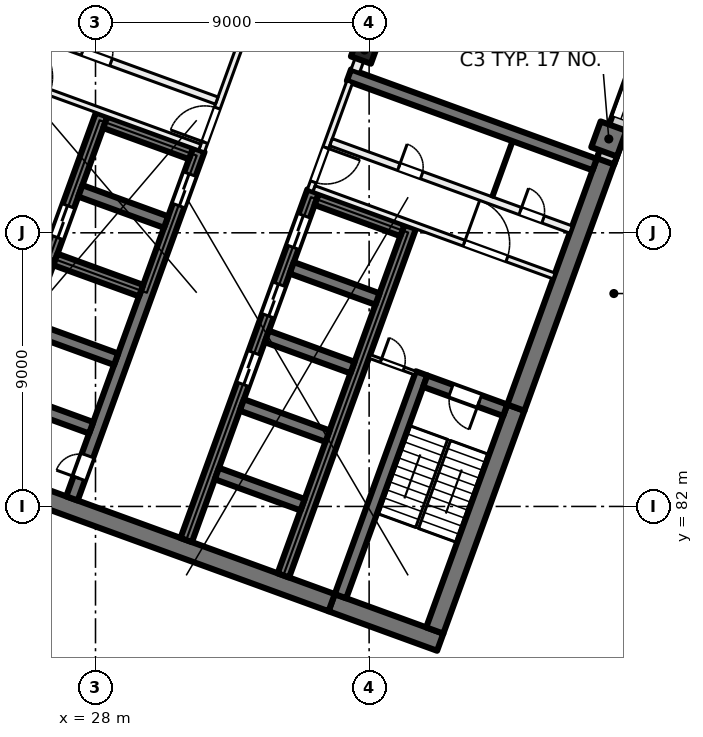
"""IFC4 building model, lengths in metres.
Left out: names, types, materials, properties, quantities, classifications, styles, units other than length and angle.
Written with IfcOpenShell. Run it as: python <this file> out.ifc"""

import sys

from ifc_helpers import new_model, si_unit, direction, frame, frame_2d, origin, origin_2d, place, context, subcontext, project, spatial, rectangle, extrude, element, fill, save


model = new_model("IFC4")
c1 = context("Model", 3, precision=1e-05, world=origin(), true_north=direction((0.0, 1.0)))
c2 = subcontext(c1, "Body", "Model", "MODEL_VIEW")
j1 = project(units=[si_unit("LENGTHUNIT", "METRE"), si_unit("PLANEANGLEUNIT", "RADIAN")], contexts=[c1])
p1 = place(None, origin())
s1 = spatial("IfcSite", under=j1, at=p1, CompositionType="ELEMENT")
p2 = place(p1, origin())
s2 = spatial("IfcBuilding", under=s1, at=p2, CompositionType="ELEMENT")
p3 = place(p2, frame((0.0, 0.0, 35.5)))
s3 = spatial("IfcBuildingStorey", under=s2, at=p3, CompositionType="ELEMENT", Elevation=35.5)
p4 = place(p3, frame((36.849, 97.011, 0.0), z_axis=(0.0, 0.0, 1.0), x_axis=(-0.342020143326, -0.939692620786, 0.0)))
e1 = element("IfcColumn", 1, at=p4, inside=s3, PredefinedType="COLUMN", context=c2, shape_type="SweptSolid", body=[
    extrude(rectangle(XDim=0.7, YDim=0.7, at=origin_2d()), origin(), (0.0, 0.0, 1.0), 4.0),
])
p5 = place(p3, frame((44.884, 94.087, 0.0), z_axis=(0.0, 0.0, 1.0), x_axis=(-0.342020143326, -0.939692620786, 0.0)))
e2 = element("IfcColumn", 2, at=p5, inside=s3, PredefinedType="COLUMN", context=c2, shape_type="SweptSolid", body=[
    extrude(rectangle(XDim=0.9, YDim=0.9, at=origin_2d()), origin(), (0.0, 0.0, 1.0), 4.0),
])
p6 = place(p3, frame((39.338, 77.535, 0.0), z_axis=(0.0, 0.0, 1.0), x_axis=(-0.939701471648, 0.341995824804, 0.0)))
e3 = element("IfcWall", 3, at=p6, inside=s3, PredefinedType="SHEAR", context=c2, shape_type="SweptSolid", body=[
    extrude(rectangle(XDim=3.8, YDim=0.6, at=frame_2d((1.9, 0.0))), origin(), (0.0, 0.0, 1.0), 4.0),
])
p7 = place(p3, frame((35.767, 78.835, 0.0), z_axis=(0.0, 0.0, 1.0), x_axis=(-0.939692894512, 0.342019391267, 0.0)))
e4 = element("IfcWall", 4, at=p7, inside=s3, PredefinedType="SHEAR", context=c2, shape_type="SweptSolid", body=[
    extrude(rectangle(XDim=14.4, YDim=0.6, at=frame_2d((7.2, 0.0))), origin(), (0.0, 0.0, 1.0), 4.0),
])
p8 = place(p3, frame((39.159, 77.92, 0.0), z_axis=(0.0, 0.0, 1.0), x_axis=(0.342016982193, 0.939693771338, 0.0)))
e5 = element("IfcWall", 5, at=p8, inside=s3, PredefinedType="SHEAR", context=c2, shape_type="SweptSolid", body=[
    extrude(rectangle(XDim=7.8, YDim=0.6, at=frame_2d((3.9, 0.0))), origin(), (0.0, 0.0, 1.0), 4.0),
])
p9 = place(p3, frame((41.827, 85.249, 0.0), z_axis=(0.0, 0.0, 1.0), x_axis=(0.342016162452, 0.939694069696, 0.0)))
e6 = element("IfcWall", 6, at=p9, inside=s3, PredefinedType="SHEAR", context=c2, shape_type="SweptSolid", body=[
    extrude(rectangle(XDim=8.9, YDim=0.6, at=frame_2d((4.45, 0.0))), origin(), (0.0, 0.0, 1.0), 4.0),
])
p10 = place(p3, frame((36.058, 79.048, 0.0), z_axis=(0.0, 0.0, 1.0), x_axis=(0.342016982193, 0.939693771338, 0.0)))
e7 = element("IfcWall", 7, at=p10, inside=s3, PredefinedType="SHEAR", context=c2, shape_type="SweptSolid", body=[
    extrude(rectangle(XDim=7.8, YDim=0.4, at=frame_2d((3.9, 0.0))), origin(), (0.0, 0.0, 1.0), 4.0),
])
p11 = place(p3, frame((41.476, 85.164, 0.0), z_axis=(0.0, 0.0, 1.0), x_axis=(-0.939678810556, 0.342058084236, 0.0)))
e8 = element("IfcWall", 8, at=p11, inside=s3, PredefinedType="SHEAR", context=c2, shape_type="SweptSolid", body=[
    extrude(rectangle(XDim=2.8, YDim=0.4, at=frame_2d((1.4, 0.0))), origin(), (0.0, 0.0, 1.0), 4.0),
])
p12 = place(p11, frame((0.9, 0.0, 0.0)))
e9 = element("IfcOpeningElement", 9, at=p12, cuts=e8, PredefinedType="OPENING", context=c2, shape_type="SweptSolid", body=[
    extrude(rectangle(XDim=1.0, YDim=2.1, at=frame_2d((0.5, 1.05))), frame((0.0, 0.21, 0.0), z_axis=(0.0, -1.0, 0.0), x_axis=(1.0, 0.0, 0.0)), (0.0, 0.0, 1.0), 0.42),
])
p13 = place(p3, frame((30.984, 80.895, 0.0), z_axis=(0.0, 0.0, 1.0), x_axis=(0.342021021735, 0.939692301071, 0.0)))
e10 = element("IfcWall", 10, at=p13, inside=s3, PredefinedType="SHEAR", context=c2, shape_type="SweptSolid", body=[
    extrude(rectangle(XDim=12.2, YDim=0.4, at=frame_2d((6.1, 0.0))), origin(), (0.0, 0.0, 1.0), 4.0),
])
p14 = place(p13, frame((5.45, 0.0, 0.0)))
e11 = element("IfcOpeningElement", 11, at=p14, cuts=e10, PredefinedType="OPENING", context=c2, shape_type="SweptSolid", body=[
    extrude(rectangle(XDim=1.1, YDim=2.1, at=frame_2d((0.55, 1.05))), frame((0.0, 0.21, 0.0), z_axis=(0.0, -1.0, 0.0), x_axis=(1.0, 0.0, 0.0)), (0.0, 0.0, 1.0), 0.42),
])
p15 = place(p13, frame((7.85, 0.0, 0.0)))
e12 = element("IfcOpeningElement", 12, at=p15, cuts=e10, PredefinedType="OPENING", context=c2, shape_type="SweptSolid", body=[
    extrude(rectangle(XDim=1.1, YDim=2.1, at=frame_2d((0.55, 1.05))), frame((0.0, 0.21, 0.0), z_axis=(0.0, -1.0, 0.0), x_axis=(1.0, 0.0, 0.0)), (0.0, 0.0, 1.0), 0.42),
])
p16 = place(p13, frame((10.25, 0.0, 0.0)))
e13 = element("IfcOpeningElement", 13, at=p16, cuts=e10, PredefinedType="OPENING", context=c2, shape_type="SweptSolid", body=[
    extrude(rectangle(XDim=1.1, YDim=2.1, at=frame_2d((0.55, 1.05))), frame((0.0, 0.21, 0.0), z_axis=(0.0, -1.0, 0.0), x_axis=(1.0, 0.0, 0.0)), (0.0, 0.0, 1.0), 0.42),
])
p17 = place(p3, frame((34.178, 79.732, 0.0), z_axis=(0.0, 0.0, 1.0), x_axis=(0.342014590177, 0.939694641948, 0.0)))
e14 = element("IfcWall", 14, at=p17, inside=s3, PredefinedType="SHEAR", context=c2, shape_type="SweptSolid", body=[
    extrude(rectangle(XDim=12.2, YDim=0.4, at=frame_2d((6.1, 0.0))), origin(), (0.0, 0.0, 1.0), 4.0),
])
for number, where, z_axis, x_axis in (
    (15, (34.812, 82.056, 0.0), (0.0, 0.0, 1.0), (-0.94, 0.342, 0.0)),
    (16, (35.632, 84.311, 0.0), (0.0, 0.0, 1.0), (-0.94, 0.342, 0.0)),
    (17, (36.453, 86.566, 0.0), (0.0, 0.0, 1.0), (-0.94, 0.342, 0.0)),
    (18, (37.274, 88.822, 0.0), (0.0, 0.0, 1.0), (-0.94, 0.342, 0.0)),
):
    element("IfcWall", number, at=place(p3, frame(where, z_axis=z_axis, x_axis=x_axis)), inside=s3, PredefinedType="SHEAR", context=c2, shape_type="SweptSolid", body=[
        extrude(rectangle(XDim=3.0, YDim=0.4, at=frame_2d((1.5, 0.0))), origin(), (0.0, 0.0, 1.0), 4.0),
    ])
p18 = place(p3, frame((38.095, 91.077, 0.0), z_axis=(0.0, 0.0, 1.0), x_axis=(-0.939676934218, 0.342063238742, 0.0)))
e19 = element("IfcWall", 19, at=p18, inside=s3, PredefinedType="SHEAR", context=c2, shape_type="SweptSolid", body=[
    extrude(rectangle(XDim=3.0, YDim=0.4, at=frame_2d((1.5, 0.0))), origin(), (0.0, 0.0, 1.0), 4.0),
])
p19 = place(p3, frame((27.225, 82.263, 0.0), z_axis=(0.0, 0.0, 1.0), x_axis=(0.342014590177, 0.939694641948, 0.0)))
e20 = element("IfcWall", 20, at=p19, inside=s3, PredefinedType="SHEAR", context=c2, shape_type="SweptSolid", body=[
    extrude(rectangle(XDim=12.2, YDim=0.4, at=frame_2d((6.1, 0.0))), origin(), (0.0, 0.0, 1.0), 4.0),
])
p20 = place(p19, frame((10.25, 0.0, 0.0)))
e21 = element("IfcOpeningElement", 21, at=p20, cuts=e20, PredefinedType="OPENING", context=c2, shape_type="SweptSolid", body=[
    extrude(rectangle(XDim=1.1, YDim=2.1, at=frame_2d((0.55, 1.05))), frame((0.0, 0.21, 0.0), z_axis=(0.0, -1.0, 0.0), x_axis=(1.0, 0.0, 0.0)), (0.0, 0.0, 1.0), 0.42),
])
p21 = place(p19, frame((0.7, 0.0, 0.0)))
e22 = element("IfcOpeningElement", 22, at=p21, cuts=e20, PredefinedType="OPENING", context=c2, shape_type="SweptSolid", body=[
    extrude(rectangle(XDim=0.8, YDim=2.1, at=frame_2d((0.4, 1.05))), frame((0.0, 0.21, 0.0), z_axis=(0.0, -1.0, 0.0), x_axis=(1.0, 0.0, 0.0)), (0.0, 0.0, 1.0), 0.42),
])
p22 = place(p3, frame((24.03, 83.426, 0.0), z_axis=(0.0, 0.0, 1.0), x_axis=(0.342014590177, 0.939694641948, 0.0)))
e23 = element("IfcWall", 23, at=p22, inside=s3, PredefinedType="SHEAR", context=c2, shape_type="SweptSolid", body=[
    extrude(rectangle(XDim=12.2, YDim=0.4, at=frame_2d((6.1, 0.0))), origin(), (0.0, 0.0, 1.0), 4.0),
])
p23 = place(p22, frame((7.9, 0.0, 0.0)))
e24 = element("IfcOpeningElement", 24, at=p23, cuts=e23, PredefinedType="OPENING", context=c2, shape_type="SweptSolid", body=[
    extrude(rectangle(XDim=1.1, YDim=2.1, at=frame_2d((0.55, 1.05))), frame((0.0, 0.21, 0.0), z_axis=(0.0, -1.0, 0.0), x_axis=(1.0, 0.0, 0.0)), (0.0, 0.0, 1.0), 0.42),
])
p24 = place(p3, frame((27.858, 84.587, 0.0), z_axis=(0.0, 0.0, 1.0), x_axis=(-0.939686455819, 0.342037080957, 0.0)))
e25 = element("IfcWall", 25, at=p24, inside=s3, PredefinedType="SHEAR", context=c2, shape_type="SweptSolid", body=[
    extrude(rectangle(XDim=3.0, YDim=0.4, at=frame_2d((1.5, 0.0))), origin(), (0.0, 0.0, 1.0), 4.0),
])
p25 = place(p3, frame((28.678, 86.842, 0.0), z_axis=(0.0, 0.0, 1.0), x_axis=(-0.939676934218, 0.342063238742, 0.0)))
e26 = element("IfcWall", 26, at=p25, inside=s3, PredefinedType="SHEAR", context=c2, shape_type="SweptSolid", body=[
    extrude(rectangle(XDim=3.0, YDim=0.4, at=frame_2d((1.5, 0.0))), origin(), (0.0, 0.0, 1.0), 4.0),
])
for number, where, z_axis, x_axis in (
    (27, (29.5, 89.097, 0.0), (0.0, 0.0, 1.0), (-0.94, 0.342, 0.0)),
    (28, (30.32, 91.353, 0.0), (0.0, 0.0, 1.0), (-0.94, 0.342, 0.0)),
    (29, (31.141, 93.608, 0.0), (0.0, 0.0, 1.0), (-0.94, 0.342, 0.0)),
):
    element("IfcWall", number, at=place(p3, frame(where, z_axis=z_axis, x_axis=x_axis)), inside=s3, PredefinedType="SHEAR", context=c2, shape_type="SweptSolid", body=[
        extrude(rectangle(XDim=3.0, YDim=0.4, at=frame_2d((1.5, 0.0))), origin(), (0.0, 0.0, 1.0), 4.0),
    ])
p26 = place(p3, frame((44.418, 93.245, 0.0), z_axis=(0.0, 0.0, 1.0), x_axis=(-0.93969060187, 0.342025690201, 0.0)))
e30 = element("IfcWall", 30, at=p26, inside=s3, PredefinedType="SHEAR", context=c2, shape_type="SweptSolid", body=[
    extrude(rectangle(XDim=8.6, YDim=0.4, at=frame_2d((4.3, 0.0))), origin(), (0.0, 0.0, 1.0), 4.0),
])
p27 = place(p3, frame((52.212, 113.783, 0.0), z_axis=(0.0, 0.0, 1.0), x_axis=(-0.34202521188, -0.939690775968, 0.0)))
e31 = element("IfcWall", 31, at=p27, inside=s3, PredefinedType="SOLIDWALL", context=c2, shape_type="SweptSolid", body=[
    extrude(rectangle(XDim=21.745, YDim=0.6, at=frame_2d((10.873, 0.0))), origin(), (0.0, 0.0, 1.0), 3.625),
])
p28 = place(p27, frame((3.765, 0.0, 0.9)))
e32 = element("IfcOpeningElement", 32, at=p28, cuts=e31, PredefinedType="OPENING", context=c2, shape_type="SweptSolid", body=[
    extrude(rectangle(XDim=3.0, YDim=2.4, at=frame_2d((1.5, 1.2))), frame((0.0, 0.31, 0.0), z_axis=(0.0, -1.0, 0.0), x_axis=(1.0, 0.0, 0.0)), (0.0, 0.0, 1.0), 0.62),
])
p29 = place(p27, frame((8.265, 0.0, 0.9)))
e33 = element("IfcOpeningElement", 33, at=p29, cuts=e31, PredefinedType="OPENING", context=c2, shape_type="SweptSolid", body=[
    extrude(rectangle(XDim=3.0, YDim=2.4, at=frame_2d((1.5, 1.2))), frame((0.0, 0.31, 0.0), z_axis=(0.0, -1.0, 0.0), x_axis=(1.0, 0.0, 0.0)), (0.0, 0.0, 1.0), 0.62),
])
p30 = place(p27, frame((12.765, 0.0, 0.9)))
e34 = element("IfcOpeningElement", 34, at=p30, cuts=e31, PredefinedType="OPENING", context=c2, shape_type="SweptSolid", body=[
    extrude(rectangle(XDim=3.0, YDim=2.4, at=frame_2d((1.5, 1.2))), frame((0.0, 0.31, 0.0), z_axis=(0.0, -1.0, 0.0), x_axis=(1.0, 0.0, 0.0)), (0.0, 0.0, 1.0), 0.62),
])
p31 = place(p27, frame((17.265, 0.0, 0.9)))
e35 = element("IfcOpeningElement", 35, at=p31, cuts=e31, PredefinedType="OPENING", context=c2, shape_type="SweptSolid", body=[
    extrude(rectangle(XDim=3.0, YDim=2.4, at=frame_2d((1.5, 1.2))), frame((0.0, 0.31, 0.0), z_axis=(0.0, -1.0, 0.0), x_axis=(1.0, 0.0, 0.0)), (0.0, 0.0, 1.0), 0.62),
])
p32 = place(p3, frame((31.491, 93.693, 0.0), z_axis=(0.0, 0.0, 1.0), x_axis=(0.341995824804, 0.939701471648, 0.0)))
e36 = element("IfcWall", 36, at=p32, inside=s3, PredefinedType="PARTITIONING", context=c2, shape_type="SweptSolid", body=[
    extrude(rectangle(XDim=3.8, YDim=0.2, at=frame_2d((1.9, 0.0))), origin(), (0.0, 0.0, 1.0), 3.625),
])
p33 = place(p32, frame((0.3, 0.0, 0.0)))
e37 = element("IfcOpeningElement", 37, at=p33, cuts=e36, PredefinedType="OPENING", context=c2, shape_type="SweptSolid", body=[
    extrude(rectangle(XDim=1.2, YDim=2.1, at=frame_2d((0.6, 1.05))), frame((0.0, 0.11, 0.0), z_axis=(0.0, -1.0, 0.0), x_axis=(1.0, 0.0, 0.0)), (0.0, 0.0, 1.0), 0.22),
])
p34 = place(p3, frame((23.538, 96.694, 0.0), z_axis=(0.0, 0.0, 1.0), x_axis=(0.939691552312, -0.342023078919, 0.0)))
e38 = element("IfcWall", 38, at=p34, inside=s3, PredefinedType="PARTITIONING", context=c2, shape_type="SweptSolid", body=[
    extrude(rectangle(XDim=8.4, YDim=0.2, at=frame_2d((4.2, 0.0))), origin(), (0.0, 0.0, 1.0), 3.625),
])
p35 = place(p34, frame((1.65, 0.0, 0.0)))
e39 = element("IfcOpeningElement", 39, at=p35, cuts=e38, PredefinedType="OPENING", context=c2, shape_type="SweptSolid", body=[
    extrude(rectangle(XDim=1.5, YDim=2.1, at=frame_2d((0.75, 1.05))), frame((0.0, 0.11, 0.0), z_axis=(0.0, -1.0, 0.0), x_axis=(1.0, 0.0, 0.0)), (0.0, 0.0, 1.0), 0.22),
])
p36 = place(p3, frame((24.094, 98.221, 0.0), z_axis=(0.0, 0.0, 1.0), x_axis=(0.939691552312, -0.342023078919, 0.0)))
e40 = element("IfcWall", 40, at=p36, inside=s3, PredefinedType="PARTITIONING", context=c2, shape_type="SweptSolid", body=[
    extrude(rectangle(XDim=8.4, YDim=0.25, at=frame_2d((4.2, 0.0))), origin(), (0.0, 0.0, 1.0), 3.625),
])
p37 = place(p36, frame((3.7, 0.0, 0.0)))
e41 = element("IfcOpeningElement", 41, at=p37, cuts=e40, PredefinedType="OPENING", context=c2, shape_type="SweptSolid", body=[
    extrude(rectangle(XDim=1.0, YDim=2.1, at=frame_2d((0.5, 1.05))), frame((0.0, 0.135, 0.0), z_axis=(0.0, -1.0, 0.0), x_axis=(1.0, 0.0, 0.0)), (0.0, 0.0, 1.0), 0.27),
])
p38 = place(p3, frame((36.362, 95.964, 0.0), z_axis=(0.0, 0.0, 1.0), x_axis=(-0.341995824804, -0.939701471648, 0.0)))
e42 = element("IfcWall", 42, at=p38, inside=s3, PredefinedType="PARTITIONING", context=c2, shape_type="SweptSolid", body=[
    extrude(rectangle(XDim=3.8, YDim=0.2, at=frame_2d((1.9, 0.0))), origin(), (0.0, 0.0, 1.0), 3.625),
])
p39 = place(p38, frame((2.3, 0.0, 0.0)))
e43 = element("IfcOpeningElement", 43, at=p39, cuts=e42, PredefinedType="OPENING", context=c2, shape_type="SweptSolid", body=[
    extrude(rectangle(XDim=1.2, YDim=2.1, at=frame_2d((0.6, 1.05))), frame((0.0, 0.11, 0.0), z_axis=(0.0, -1.0, 0.0), x_axis=(1.0, 0.0, 0.0)), (0.0, 0.0, 1.0), 0.22),
])
p40 = place(p3, frame((35.19, 92.453, 0.0), z_axis=(0.0, 0.0, 1.0), x_axis=(0.939691552312, -0.342023078919, 0.0)))
e44 = element("IfcWall", 44, at=p40, inside=s3, PredefinedType="PARTITIONING", context=c2, shape_type="SweptSolid", body=[
    extrude(rectangle(XDim=8.4, YDim=0.2, at=frame_2d((4.2, 0.0))), origin(), (0.0, 0.0, 1.0), 3.625),
])
p41 = place(p40, frame((5.25, 0.0, 0.0)))
e45 = element("IfcOpeningElement", 45, at=p41, cuts=e44, PredefinedType="OPENING", context=c2, shape_type="SweptSolid", body=[
    extrude(rectangle(XDim=1.5, YDim=2.1, at=frame_2d((0.75, 1.05))), frame((0.0, 0.11, 0.0), z_axis=(0.0, -1.0, 0.0), x_axis=(1.0, 0.0, 0.0)), (0.0, 0.0, 1.0), 0.22),
])
p42 = place(p3, frame((35.746, 93.98, 0.0), z_axis=(0.0, 0.0, 1.0), x_axis=(0.939691552312, -0.342023078919, 0.0)))
e46 = element("IfcWall", 46, at=p42, inside=s3, PredefinedType="PARTITIONING", context=c2, shape_type="SweptSolid", body=[
    extrude(rectangle(XDim=8.4, YDim=0.25, at=frame_2d((4.2, 0.0))), origin(), (0.0, 0.0, 1.0), 3.625),
])
p43 = place(p42, frame((2.375, 0.0, 0.0)))
e47 = element("IfcOpeningElement", 47, at=p43, cuts=e46, PredefinedType="OPENING", context=c2, shape_type="SweptSolid", body=[
    extrude(rectangle(XDim=0.8, YDim=2.1, at=frame_2d((0.4, 1.05))), frame((0.0, 0.135, 0.0), z_axis=(0.0, -1.0, 0.0), x_axis=(1.0, 0.0, 0.0)), (0.0, 0.0, 1.0), 0.27),
])
p44 = place(p42, frame((6.625, 0.0, 0.0)))
e48 = element("IfcOpeningElement", 48, at=p44, cuts=e46, PredefinedType="OPENING", context=c2, shape_type="SweptSolid", body=[
    extrude(rectangle(XDim=0.8, YDim=2.1, at=frame_2d((0.4, 1.05))), frame((0.0, 0.135, 0.0), z_axis=(0.0, -1.0, 0.0), x_axis=(1.0, 0.0, 0.0)), (0.0, 0.0, 1.0), 0.27),
])
p45 = place(p3, frame((37.013, 86.935, 0.0), z_axis=(0.0, 0.0, 1.0), x_axis=(0.939659694648, -0.342110593602, 0.0)))
e49 = element("IfcWall", 49, at=p45, inside=s3, PredefinedType="PARTITIONING", context=c2, shape_type="SweptSolid", body=[
    extrude(rectangle(XDim=1.6, YDim=0.125, at=frame_2d((0.8, 0.0))), origin(), (0.0, 0.0, 1.0), 3.625),
])
p46 = place(p45, frame((0.4, 0.0, 0.0)))
e50 = element("IfcOpeningElement", 50, at=p46, cuts=e49, PredefinedType="OPENING", context=c2, shape_type="SweptSolid", body=[
    extrude(rectangle(XDim=0.8, YDim=2.1, at=frame_2d((0.4, 1.05))), frame((0.0, 0.073, 0.0), z_axis=(0.0, -1.0, 0.0), x_axis=(1.0, 0.0, 0.0)), (0.0, 0.0, 1.0), 0.145),
])
p47 = place(p3, frame((41.718, 94.015, 0.0), z_axis=(0.0, 0.0, 1.0), x_axis=(-0.342064742067, -0.939676386973, 0.0)))
e51 = element("IfcWall", 51, at=p47, inside=s3, PredefinedType="PARTITIONING", context=c2, shape_type="SweptSolid", body=[
    extrude(rectangle(XDim=1.95, YDim=0.1, at=frame_2d((0.975, 0.0))), origin(), (0.0, 0.0, 1.0), 3.625),
])
p48 = place(p3, frame((47.314, 125.909, 0.0), z_axis=(0.0, 0.0, 1.0), x_axis=(-0.342010770371, -0.939696032209, 0.0)))
e52 = element("IfcWall", 52, at=p48, inside=s3, PredefinedType="PARTITIONING", context=c2, shape_type="SweptSolid", body=[
    extrude(rectangle(XDim=31.485, YDim=0.3, at=frame_2d((15.742, 0.0))), origin(), (0.0, 0.0, 1.0), 3.625),
])
p49 = place(p48, frame((16.709, 0.0, 0.0)))
e53 = element("IfcOpeningElement", 53, at=p49, cuts=e52, PredefinedType="OPENING", context=c2, shape_type="SweptSolid", body=[
    extrude(rectangle(XDim=1.8, YDim=2.1, at=frame_2d((0.9, 1.05))), frame((0.0, 0.16, 0.0), z_axis=(0.0, -1.0, 0.0), x_axis=(1.0, 0.0, 0.0)), (0.0, 0.0, 1.0), 0.32),
])
p50 = place(p31, origin())
e54 = element("IfcWindow", 54, at=p50, inside=s3, PartitioningType="SINGLE_PANEL", PredefinedType="WINDOW", context=c2, shape_type="SweptSolid", body=[
    extrude(rectangle(XDim=3.0, YDim=2.4, at=frame_2d((1.5, 1.2))), frame((0.0, 0.03, 0.0), z_axis=(0.0, -1.0, 0.0), x_axis=(1.0, 0.0, 0.0)), (0.0, 0.0, 1.0), 0.06),
])
fill(e35, e54)
p51 = place(p20, origin())
e55 = element("IfcDoor", 55, at=p51, inside=s3, OperationType="DOUBLE_DOOR_SLIDING", PredefinedType="DOOR", context=c2, shape_type="SweptSolid", body=[
    extrude(rectangle(XDim=1.1, YDim=2.1, at=frame_2d((0.55, 1.05))), frame((0.0, 0.025, 0.0), z_axis=(0.0, -1.0, 0.0), x_axis=(1.0, 0.0, 0.0)), (0.0, 0.0, 1.0), 0.05),
])
fill(e21, e55)
p52 = place(p14, origin())
e56 = element("IfcDoor", 56, at=p52, inside=s3, OperationType="DOUBLE_DOOR_SLIDING", PredefinedType="DOOR", context=c2, shape_type="SweptSolid", body=[
    extrude(rectangle(XDim=1.1, YDim=2.1, at=frame_2d((0.55, 1.05))), frame((0.0, 0.025, 0.0), z_axis=(0.0, -1.0, 0.0), x_axis=(1.0, 0.0, 0.0)), (0.0, 0.0, 1.0), 0.05),
])
fill(e11, e56)
p53 = place(p15, origin())
e57 = element("IfcDoor", 57, at=p53, inside=s3, OperationType="DOUBLE_DOOR_SLIDING", PredefinedType="DOOR", context=c2, shape_type="SweptSolid", body=[
    extrude(rectangle(XDim=1.1, YDim=2.1, at=frame_2d((0.55, 1.05))), frame((0.0, 0.025, 0.0), z_axis=(0.0, -1.0, 0.0), x_axis=(1.0, 0.0, 0.0)), (0.0, 0.0, 1.0), 0.05),
])
fill(e12, e57)
p54 = place(p16, origin())
e58 = element("IfcDoor", 58, at=p54, inside=s3, OperationType="DOUBLE_DOOR_SLIDING", PredefinedType="DOOR", context=c2, shape_type="SweptSolid", body=[
    extrude(rectangle(XDim=1.1, YDim=2.1, at=frame_2d((0.55, 1.05))), frame((0.0, 0.025, 0.0), z_axis=(0.0, -1.0, 0.0), x_axis=(1.0, 0.0, 0.0)), (0.0, 0.0, 1.0), 0.05),
])
fill(e13, e58)
p55 = place(p21, origin())
e59 = element("IfcDoor", 59, at=p55, inside=s3, OperationType="SINGLE_SWING_LEFT", PredefinedType="DOOR", context=c2, shape_type="SweptSolid", body=[
    extrude(rectangle(XDim=0.8, YDim=2.1, at=frame_2d((0.4, 1.05))), frame((0.0, 0.025, 0.0), z_axis=(0.0, -1.0, 0.0), x_axis=(1.0, 0.0, 0.0)), (0.0, 0.0, 1.0), 0.05),
])
fill(e22, e59)
p56 = place(p33, origin())
e60 = element("IfcDoor", 60, at=p56, inside=s3, OperationType="DOUBLE_DOOR_SINGLE_SWING", PredefinedType="DOOR", context=c2, shape_type="SweptSolid", body=[
    extrude(rectangle(XDim=1.2, YDim=2.1, at=frame_2d((0.6, 1.05))), frame((0.0, 0.025, 0.0), z_axis=(0.0, -1.0, 0.0), x_axis=(1.0, 0.0, 0.0)), (0.0, 0.0, 1.0), 0.05),
])
fill(e37, e60)
p57 = place(p37, origin())
e61 = element("IfcDoor", 61, at=p57, inside=s3, OperationType="SINGLE_SWING_LEFT", PredefinedType="DOOR", context=c2, shape_type="SweptSolid", body=[
    extrude(rectangle(XDim=1.0, YDim=2.1, at=frame_2d((0.5, 1.05))), frame((0.0, 0.025, 0.0), z_axis=(0.0, -1.0, 0.0), x_axis=(1.0, 0.0, 0.0)), (0.0, 0.0, 1.0), 0.05),
])
fill(e41, e61)
p58 = place(p39, origin())
e62 = element("IfcDoor", 62, at=p58, inside=s3, OperationType="DOUBLE_DOOR_SINGLE_SWING", PredefinedType="DOOR", context=c2, shape_type="SweptSolid", body=[
    extrude(rectangle(XDim=1.2, YDim=2.1, at=frame_2d((0.6, 1.05))), frame((0.0, 0.025, 0.0), z_axis=(0.0, -1.0, 0.0), x_axis=(1.0, 0.0, 0.0)), (0.0, 0.0, 1.0), 0.05),
])
fill(e43, e62)
p59 = place(p41, origin())
e63 = element("IfcDoor", 63, at=p59, inside=s3, OperationType="DOUBLE_DOOR_SINGLE_SWING", PredefinedType="DOOR", context=c2, shape_type="SweptSolid", body=[
    extrude(rectangle(XDim=1.5, YDim=2.1, at=frame_2d((0.75, 1.05))), frame((0.0, 0.025, 0.0), z_axis=(0.0, -1.0, 0.0), x_axis=(1.0, 0.0, 0.0)), (0.0, 0.0, 1.0), 0.05),
])
fill(e45, e63)
p60 = place(p12, origin())
e64 = element("IfcDoor", 64, at=p60, inside=s3, OperationType="SINGLE_SWING_RIGHT", PredefinedType="DOOR", context=c2, shape_type="SweptSolid", body=[
    extrude(rectangle(XDim=1.0, YDim=2.1, at=frame_2d((0.5, 1.05))), frame((0.0, 0.025, 0.0), z_axis=(0.0, -1.0, 0.0), x_axis=(1.0, 0.0, 0.0)), (0.0, 0.0, 1.0), 0.05),
])
fill(e9, e64)
p61 = place(p46, origin())
e65 = element("IfcDoor", 65, at=p61, inside=s3, OperationType="SINGLE_SWING_LEFT", PredefinedType="DOOR", context=c2, shape_type="SweptSolid", body=[
    extrude(rectangle(XDim=0.8, YDim=2.1, at=frame_2d((0.4, 1.05))), frame((0.0, 0.025, 0.0), z_axis=(0.0, -1.0, 0.0), x_axis=(1.0, 0.0, 0.0)), (0.0, 0.0, 1.0), 0.05),
])
fill(e50, e65)
p62 = place(p43, origin())
e66 = element("IfcDoor", 66, at=p62, inside=s3, OperationType="SINGLE_SWING_RIGHT", PredefinedType="DOOR", context=c2, shape_type="SweptSolid", body=[
    extrude(rectangle(XDim=0.8, YDim=2.1, at=frame_2d((0.4, 1.05))), frame((0.0, 0.025, 0.0), z_axis=(0.0, -1.0, 0.0), x_axis=(1.0, 0.0, 0.0)), (0.0, 0.0, 1.0), 0.05),
])
fill(e47, e66)
p63 = place(p44, origin())
e67 = element("IfcDoor", 67, at=p63, inside=s3, OperationType="SINGLE_SWING_LEFT", PredefinedType="DOOR", context=c2, shape_type="SweptSolid", body=[
    extrude(rectangle(XDim=0.8, YDim=2.1, at=frame_2d((0.4, 1.05))), frame((0.0, 0.025, 0.0), z_axis=(0.0, -1.0, 0.0), x_axis=(1.0, 0.0, 0.0)), (0.0, 0.0, 1.0), 0.05),
])
fill(e48, e67)
p64 = place(p23, origin())
e68 = element("IfcDoor", 68, at=p64, inside=s3, OperationType="DOUBLE_DOOR_SLIDING", PredefinedType="DOOR", context=c2, shape_type="SweptSolid", body=[
    extrude(rectangle(XDim=1.1, YDim=2.1, at=frame_2d((0.55, 1.05))), frame((0.0, 0.025, 0.0), z_axis=(0.0, -1.0, 0.0), x_axis=(1.0, 0.0, 0.0)), (0.0, 0.0, 1.0), 0.05),
])
fill(e24, e68)
save(model, sys.argv[1])
